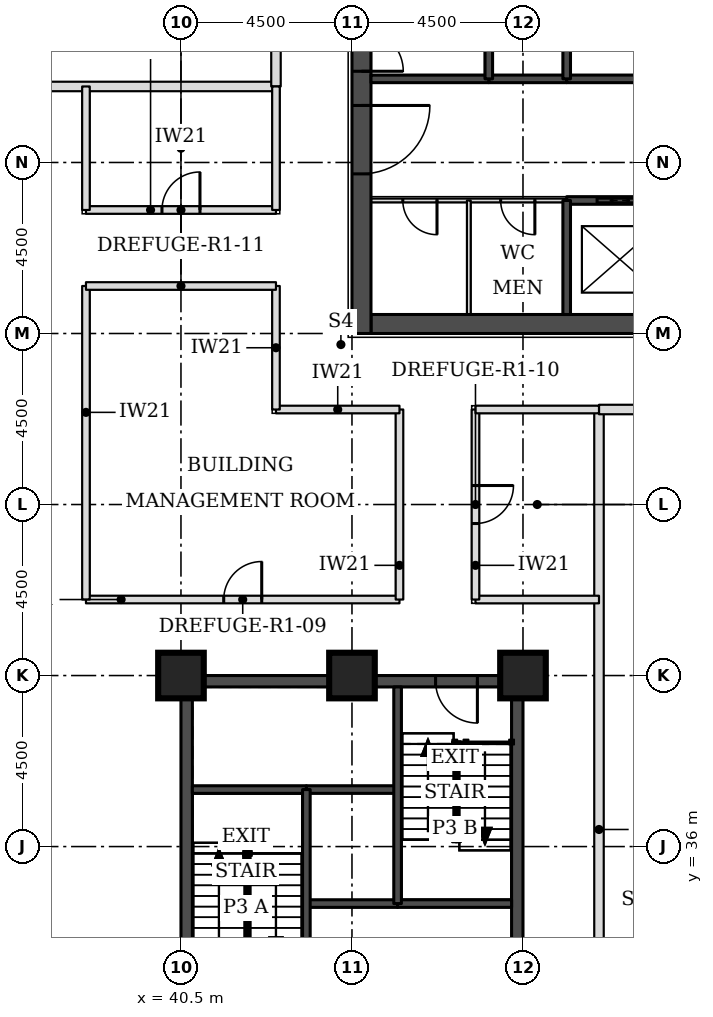
"""IFC4 building model, lengths in metres.
Left out: names, types, materials, properties, quantities, classifications, styles, units other than length and angle.
Written with IfcOpenShell. Run it as: python <this file> out.ifc"""

import sys

from ifc_helpers import new_model, si_unit, direction, frame, frame_2d, origin, origin_2d, place, context, subcontext, project, spatial, rectangle, extrude, element, fill, save


model = new_model("IFC4")
c1 = context("Model", 3, precision=1e-05, world=origin(), true_north=direction((0.0, 1.0)))
c2 = subcontext(c1, "Body", "Model", "MODEL_VIEW")
j1 = project(units=[si_unit("LENGTHUNIT", "METRE"), si_unit("PLANEANGLEUNIT", "RADIAN")], contexts=[c1])
p1 = place(None, origin())
s1 = spatial("IfcSite", under=j1, at=p1, CompositionType="ELEMENT")
p2 = place(p1, origin())
s2 = spatial("IfcBuilding", under=s1, at=p2, CompositionType="ELEMENT")
p3 = place(p2, frame((0.0, 0.0, 69.3)))
s3 = spatial("IfcBuildingStorey", under=s2, at=p3, CompositionType="ELEMENT", Elevation=69.3)
for number, where, z_axis, x_axis in (
    (1, (40.5, 40.5, 0.0), (0.0, 0.0, 1.0), (1.0, 0.0, 0.0)),
    (2, (45.0, 40.5, 0.0), (0.0, 0.0, 1.0), (1.0, 0.0, 0.0)),
    (3, (49.5, 40.5, 0.0), (0.0, 0.0, 1.0), (1.0, 0.0, 0.0)),
):
    element("IfcColumn", number, at=place(p3, frame(where, z_axis=z_axis, x_axis=x_axis)), inside=s3, PredefinedType="COLUMN", context=c2, shape_type="SweptSolid", body=[
        extrude(rectangle(XDim=1.2, YDim=1.2, at=origin_2d()), origin(), (0.0, 0.0, 1.0), 5.0),
    ])
p4 = place(p3, frame((45.5, 49.75, 0.0), z_axis=(0.0, 0.0, 1.0), x_axis=(1.0, 0.0, 0.0)))
e4 = element("IfcWall", 4, at=p4, inside=s3, PredefinedType="SHEAR", context=c2, shape_type="SweptSolid", body=[
    extrude(rectangle(XDim=21.5, YDim=0.5, at=frame_2d((10.75, 0.0))), origin(), (0.0, 0.0, 1.0), 5.0),
])
p5 = place(p3, frame((45.25, 49.5, 0.0), z_axis=(0.0, 0.0, 1.0), x_axis=(0.0, 1.0, 0.0)))
e5 = element("IfcWall", 5, at=p5, inside=s3, PredefinedType="SHEAR", context=c2, shape_type="SweptSolid", body=[
    extrude(rectangle(XDim=22.5, YDim=0.5, at=frame_2d((11.25, 0.0))), origin(), (0.0, 0.0, 1.0), 5.0),
])
p6 = place(p5, frame((4.2, 0.0, 0.0)))
e6 = element("IfcOpeningElement", 6, at=p6, cuts=e5, PredefinedType="OPENING", context=c2, shape_type="SweptSolid", body=[
    extrude(rectangle(XDim=1.8, YDim=2.1, at=frame_2d((0.9, 1.05))), frame((0.0, 0.26, 0.0), z_axis=(0.0, -1.0, 0.0), x_axis=(1.0, 0.0, 0.0)), (0.0, 0.0, 1.0), 0.52),
])
p7 = place(p5, frame((6.9, 0.0, 0.0)))
e7 = element("IfcOpeningElement", 7, at=p7, cuts=e5, PredefinedType="OPENING", context=c2, shape_type="SweptSolid", body=[
    extrude(rectangle(XDim=1.1, YDim=2.1, at=frame_2d((0.55, 1.05))), frame((0.0, 0.26, 0.0), z_axis=(0.0, -1.0, 0.0), x_axis=(1.0, 0.0, 0.0)), (0.0, 0.0, 1.0), 0.52),
])
p8 = place(p5, frame((13.6, 0.0, 0.0)))
e8 = element("IfcOpeningElement", 8, at=p8, cuts=e5, PredefinedType="OPENING", context=c2, shape_type="SweptSolid", body=[
    extrude(rectangle(XDim=1.1, YDim=2.1, at=frame_2d((0.55, 1.05))), frame((0.0, 0.26, 0.0), z_axis=(0.0, -1.0, 0.0), x_axis=(1.0, 0.0, 0.0)), (0.0, 0.0, 1.0), 0.52),
])
p9 = place(p5, frame((16.5, 0.0, 0.0)))
e9 = element("IfcOpeningElement", 9, at=p9, cuts=e5, PredefinedType="OPENING", context=c2, shape_type="SweptSolid", body=[
    extrude(rectangle(XDim=1.8, YDim=2.1, at=frame_2d((0.9, 1.05))), frame((0.0, 0.26, 0.0), z_axis=(0.0, -1.0, 0.0), x_axis=(1.0, 0.0, 0.0)), (0.0, 0.0, 1.0), 0.52),
])
p10 = place(p3, frame((40.8, 40.35, 0.0), z_axis=(0.0, 0.0, 1.0), x_axis=(1.0, 0.0, 0.0)))
e10 = element("IfcWall", 10, at=p10, inside=s3, PredefinedType="SHEAR", context=c2, shape_type="SweptSolid", body=[
    extrude(rectangle(XDim=8.4, YDim=0.3, at=frame_2d((4.2, 0.0))), origin(), (0.0, 0.0, 1.0), 5.0),
])
p11 = place(p10, frame((6.4, 0.0, 0.0)))
e11 = element("IfcOpeningElement", 11, at=p11, cuts=e10, PredefinedType="OPENING", context=c2, shape_type="SweptSolid", body=[
    extrude(rectangle(XDim=1.1, YDim=2.1, at=frame_2d((0.55, 1.05))), frame((0.0, 0.16, 0.0), z_axis=(0.0, -1.0, 0.0), x_axis=(1.0, 0.0, 0.0)), (0.0, 0.0, 1.0), 0.32),
])
p12 = place(p3, frame((40.65, 31.5, 0.0), z_axis=(0.0, 0.0, 1.0), x_axis=(0.0, 1.0, 0.0)))
e12 = element("IfcWall", 12, at=p12, inside=s3, PredefinedType="SHEAR", context=c2, shape_type="SweptSolid", body=[
    extrude(rectangle(XDim=9.0, YDim=0.3, at=frame_2d((4.5, 0.0))), origin(), (0.0, 0.0, 1.0), 5.0),
])
p13 = place(p12, frame((0.4, 0.0, 0.0)))
e13 = element("IfcOpeningElement", 13, at=p13, cuts=e12, PredefinedType="OPENING", context=c2, shape_type="SweptSolid", body=[
    extrude(rectangle(XDim=1.1, YDim=2.1, at=frame_2d((0.55, 1.05))), frame((0.0, 0.16, 0.0), z_axis=(0.0, -1.0, 0.0), x_axis=(1.0, 0.0, 0.0)), (0.0, 0.0, 1.0), 0.32),
])
p14 = place(p3, frame((49.35, 31.5, 0.0), z_axis=(0.0, 0.0, 1.0), x_axis=(0.0, 1.0, 0.0)))
e14 = element("IfcWall", 14, at=p14, inside=s3, PredefinedType="SHEAR", context=c2, shape_type="SweptSolid", body=[
    extrude(rectangle(XDim=9.0, YDim=0.3, at=frame_2d((4.5, 0.0))), origin(), (0.0, 0.0, 1.0), 5.0),
])
p15 = place(p3, frame((51.5, 25.399, 0.0), z_axis=(0.0, 0.0, 1.0), x_axis=(0.0, 1.0, 0.0)))
e15 = element("IfcWall", 15, at=p15, inside=s3, PredefinedType="PARTITIONING", context=c2, shape_type="SweptSolid", body=[
    extrude(rectangle(XDim=22.101, YDim=0.25, at=frame_2d((11.051, 0.0))), origin(), (0.0, 0.0, 1.0), 4.85),
])
p16 = place(p3, frame((51.5, 47.5, 0.0), z_axis=(0.0, 0.0, 1.0), x_axis=(1.0, 0.0, 0.0)))
e16 = element("IfcWall", 16, at=p16, inside=s3, PredefinedType="PARTITIONING", context=c2, shape_type="SweptSolid", body=[
    extrude(rectangle(XDim=18.0, YDim=0.25, at=frame_2d((9.0, 0.0))), origin(), (0.0, 0.0, 1.0), 4.85),
])
p17 = place(p3, frame((27.0, 56.0, 0.0), z_axis=(0.0, 0.0, 1.0), x_axis=(1.0, 0.0, 0.0)))
e17 = element("IfcWall", 17, at=p17, inside=s3, PredefinedType="PARTITIONING", context=c2, shape_type="SweptSolid", body=[
    extrude(rectangle(XDim=16.0, YDim=0.25, at=frame_2d((8.0, 0.0))), origin(), (0.0, 0.0, 1.0), 4.85),
])
p18 = place(p3, frame((43.0, 56.0, 0.0), z_axis=(0.0, 0.0, 1.0), x_axis=(0.0, 1.0, 0.0)))
e18 = element("IfcWall", 18, at=p18, inside=s3, PredefinedType="PARTITIONING", context=c2, shape_type="SweptSolid", body=[
    extrude(rectangle(XDim=18.0, YDim=0.25, at=frame_2d((9.0, 0.0))), origin(), (0.0, 0.0, 1.0), 4.85),
])
p19 = place(p3, frame((38.0, 42.5, 0.0), z_axis=(0.0, 0.0, 1.0), x_axis=(1.0, 0.0, 0.0)))
e19 = element("IfcWall", 19, at=p19, inside=s3, PredefinedType="PARTITIONING", context=c2, shape_type="SweptSolid", body=[
    extrude(rectangle(XDim=8.25, YDim=0.2, at=frame_2d((4.125, 0.0))), origin(), (0.0, 0.0, 1.0), 4.85),
])
p20 = place(p19, frame((3.625, 0.0, 0.0)))
e20 = element("IfcOpeningElement", 20, at=p20, cuts=e19, PredefinedType="OPENING", context=c2, shape_type="SweptSolid", body=[
    extrude(rectangle(XDim=1.0, YDim=2.1, at=frame_2d((0.5, 1.05))), frame((0.0, 0.11, 0.0), z_axis=(0.0, -1.0, 0.0), x_axis=(1.0, 0.0, 0.0)), (0.0, 0.0, 1.0), 0.22),
])
p21 = place(p3, frame((38.0, 42.5, 0.0), z_axis=(0.0, 0.0, 1.0), x_axis=(0.0, 1.0, 0.0)))
e21 = element("IfcWall", 21, at=p21, inside=s3, PredefinedType="PARTITIONING", context=c2, shape_type="SweptSolid", body=[
    extrude(rectangle(XDim=8.25, YDim=0.2, at=frame_2d((4.125, 0.0))), origin(), (0.0, 0.0, 1.0), 4.85),
])
p22 = place(p3, frame((46.25, 42.5, 0.0), z_axis=(0.0, 0.0, 1.0), x_axis=(0.0, 1.0, 0.0)))
e22 = element("IfcWall", 22, at=p22, inside=s3, PredefinedType="PARTITIONING", context=c2, shape_type="SweptSolid", body=[
    extrude(rectangle(XDim=5.0, YDim=0.2, at=frame_2d((2.5, 0.0))), origin(), (0.0, 0.0, 1.0), 4.85),
])
p23 = place(p3, frame((48.25, 42.5, 0.0), z_axis=(0.0, 0.0, 1.0), x_axis=(1.0, 0.0, 0.0)))
e23 = element("IfcWall", 23, at=p23, inside=s3, PredefinedType="PARTITIONING", context=c2, shape_type="SweptSolid", body=[
    extrude(rectangle(XDim=3.25, YDim=0.2, at=frame_2d((1.625, 0.0))), origin(), (0.0, 0.0, 1.0), 4.85),
])
p24 = place(p3, frame((48.25, 42.5, 0.0), z_axis=(0.0, 0.0, 1.0), x_axis=(0.0, 1.0, 0.0)))
e24 = element("IfcWall", 24, at=p24, inside=s3, PredefinedType="PARTITIONING", context=c2, shape_type="SweptSolid", body=[
    extrude(rectangle(XDim=5.0, YDim=0.2, at=frame_2d((2.5, 0.0))), origin(), (0.0, 0.0, 1.0), 4.85),
])
p25 = place(p24, frame((2.0, 0.0, 0.0)))
e25 = element("IfcOpeningElement", 25, at=p25, cuts=e24, PredefinedType="OPENING", context=c2, shape_type="SweptSolid", body=[
    extrude(rectangle(XDim=1.0, YDim=2.1, at=frame_2d((0.5, 1.05))), frame((0.0, 0.11, 0.0), z_axis=(0.0, -1.0, 0.0), x_axis=(1.0, 0.0, 0.0)), (0.0, 0.0, 1.0), 0.22),
])
for number, where, z_axis, x_axis in (
    (26, (43.0, 47.5, 0.0), (0.0, 0.0, 1.0), (1.0, 0.0, 0.0)),
    (27, (43.0, 47.5, 0.0), (0.0, 0.0, 1.0), (0.0, 1.0, 0.0)),
    (28, (48.25, 47.5, 0.0), (0.0, 0.0, 1.0), (1.0, 0.0, 0.0)),
):
    element("IfcWall", number, at=place(p3, frame(where, z_axis=z_axis, x_axis=x_axis)), inside=s3, PredefinedType="PARTITIONING", context=c2, shape_type="SweptSolid", body=[
        extrude(rectangle(XDim=3.25, YDim=0.2, at=frame_2d((1.625, 0.0))), origin(), (0.0, 0.0, 1.0), 4.85),
    ])
p26 = place(p3, frame((38.0, 50.75, 0.0), z_axis=(0.0, 0.0, 1.0), x_axis=(1.0, 0.0, 0.0)))
e29 = element("IfcWall", 29, at=p26, inside=s3, PredefinedType="PARTITIONING", context=c2, shape_type="SweptSolid", body=[
    extrude(rectangle(XDim=5.0, YDim=0.2, at=frame_2d((2.5, 0.0))), origin(), (0.0, 0.0, 1.0), 4.85),
])
p27 = place(p3, frame((38.0, 52.75, 0.0), z_axis=(0.0, 0.0, 1.0), x_axis=(1.0, 0.0, 0.0)))
e30 = element("IfcWall", 30, at=p27, inside=s3, PredefinedType="PARTITIONING", context=c2, shape_type="SweptSolid", body=[
    extrude(rectangle(XDim=5.0, YDim=0.2, at=frame_2d((2.5, 0.0))), origin(), (0.0, 0.0, 1.0), 4.85),
])
p28 = place(p27, frame((2.0, 0.0, 0.0)))
e31 = element("IfcOpeningElement", 31, at=p28, cuts=e30, PredefinedType="OPENING", context=c2, shape_type="SweptSolid", body=[
    extrude(rectangle(XDim=1.0, YDim=2.1, at=frame_2d((0.5, 1.05))), frame((0.0, 0.11, 0.0), z_axis=(0.0, -1.0, 0.0), x_axis=(1.0, 0.0, 0.0)), (0.0, 0.0, 1.0), 0.22),
])
for number, where, z_axis, x_axis in (
    (32, (38.0, 52.75, 0.0), (0.0, 0.0, 1.0), (0.0, 1.0, 0.0)),
    (33, (43.0, 52.75, 0.0), (0.0, 0.0, 1.0), (0.0, 1.0, 0.0)),
):
    element("IfcWall", number, at=place(p3, frame(where, z_axis=z_axis, x_axis=x_axis)), inside=s3, PredefinedType="PARTITIONING", context=c2, shape_type="SweptSolid", body=[
        extrude(rectangle(XDim=3.25, YDim=0.2, at=frame_2d((1.625, 0.0))), origin(), (0.0, 0.0, 1.0), 4.85),
    ])
p29 = place(p3, frame((45.5, 53.0, 0.0), z_axis=(0.0, 0.0, 1.0), x_axis=(1.0, 0.0, 0.0)))
e34 = element("IfcWall", 34, at=p29, inside=s3, PredefinedType="PARTITIONING", context=c2, shape_type="SweptSolid", body=[
    extrude(rectangle(XDim=5.15, YDim=0.1, at=frame_2d((2.575, 0.0))), origin(), (0.0, 0.0, 1.0), 4.85),
])
p30 = place(p29, frame((0.837, 0.0, 0.0)))
e35 = element("IfcOpeningElement", 35, at=p30, cuts=e34, PredefinedType="OPENING", context=c2, shape_type="SweptSolid", body=[
    extrude(rectangle(XDim=0.9, YDim=2.1, at=frame_2d((0.45, 1.05))), frame((0.0, 0.06, 0.0), z_axis=(0.0, -1.0, 0.0), x_axis=(1.0, 0.0, 0.0)), (0.0, 0.0, 1.0), 0.12),
])
p31 = place(p29, frame((3.413, 0.0, 0.0)))
e36 = element("IfcOpeningElement", 36, at=p31, cuts=e34, PredefinedType="OPENING", context=c2, shape_type="SweptSolid", body=[
    extrude(rectangle(XDim=0.9, YDim=2.1, at=frame_2d((0.45, 1.05))), frame((0.0, 0.06, 0.0), z_axis=(0.0, -1.0, 0.0), x_axis=(1.0, 0.0, 0.0)), (0.0, 0.0, 1.0), 0.12),
])
p32 = place(p3, frame((50.65, 53.0, 0.0), z_axis=(0.0, 0.0, 1.0), x_axis=(1.0, 0.0, 0.0)))
e37 = element("IfcWall", 37, at=p32, inside=s3, PredefinedType="SOLIDWALL", context=c2, shape_type="SweptSolid", body=[
    extrude(rectangle(XDim=11.2, YDim=0.2, at=frame_2d((5.6, 0.0))), origin(), (0.0, 0.0, 1.0), 4.85),
])
p33 = place(p32, frame((0.8, 0.0, 0.0)))
e38 = element("IfcOpeningElement", 38, at=p33, cuts=e37, PredefinedType="OPENING", context=c2, shape_type="SweptSolid", body=[
    extrude(rectangle(XDim=1.2, YDim=2.1, at=frame_2d((0.6, 1.05))), frame((0.0, 0.11, 0.0), z_axis=(0.0, -1.0, 0.0), x_axis=(1.0, 0.0, 0.0)), (0.0, 0.0, 1.0), 0.22),
])
p34 = place(p32, frame((3.6, 0.0, 0.0)))
e39 = element("IfcOpeningElement", 39, at=p34, cuts=e37, PredefinedType="OPENING", context=c2, shape_type="SweptSolid", body=[
    extrude(rectangle(XDim=1.2, YDim=2.1, at=frame_2d((0.6, 1.05))), frame((0.0, 0.11, 0.0), z_axis=(0.0, -1.0, 0.0), x_axis=(1.0, 0.0, 0.0)), (0.0, 0.0, 1.0), 0.22),
])
p35 = place(p32, frame((6.4, 0.0, 0.0)))
e40 = element("IfcOpeningElement", 40, at=p35, cuts=e37, PredefinedType="OPENING", context=c2, shape_type="SweptSolid", body=[
    extrude(rectangle(XDim=1.2, YDim=2.1, at=frame_2d((0.6, 1.05))), frame((0.0, 0.11, 0.0), z_axis=(0.0, -1.0, 0.0), x_axis=(1.0, 0.0, 0.0)), (0.0, 0.0, 1.0), 0.22),
])
p36 = place(p32, frame((9.2, 0.0, 0.0)))
e41 = element("IfcOpeningElement", 41, at=p36, cuts=e37, PredefinedType="OPENING", context=c2, shape_type="SweptSolid", body=[
    extrude(rectangle(XDim=1.2, YDim=2.1, at=frame_2d((0.6, 1.05))), frame((0.0, 0.11, 0.0), z_axis=(0.0, -1.0, 0.0), x_axis=(1.0, 0.0, 0.0)), (0.0, 0.0, 1.0), 0.22),
])
p37 = place(p3, frame((48.6, 56.2, 0.0), z_axis=(0.0, 0.0, 1.0), x_axis=(1.0, 0.0, 0.0)))
e42 = element("IfcWall", 42, at=p37, inside=s3, PredefinedType="SOLIDWALL", context=c2, shape_type="SweptSolid", body=[
    extrude(rectangle(XDim=2.05, YDim=0.2, at=frame_2d((1.025, 0.0))), origin(), (0.0, 0.0, 1.0), 4.85),
])
p38 = place(p3, frame((45.5, 56.2, 0.0), z_axis=(0.0, 0.0, 1.0), x_axis=(1.0, 0.0, 0.0)))
e43 = element("IfcWall", 43, at=p38, inside=s3, PredefinedType="SOLIDWALL", context=c2, shape_type="SweptSolid", body=[
    extrude(rectangle(XDim=3.1, YDim=0.2, at=frame_2d((1.55, 0.0))), origin(), (0.0, 0.0, 1.0), 4.85),
])
p39 = place(p3, frame((50.65, 56.2, 0.0), z_axis=(0.0, 0.0, 1.0), x_axis=(1.0, 0.0, 0.0)))
e44 = element("IfcWall", 44, at=p39, inside=s3, PredefinedType="SOLIDWALL", context=c2, shape_type="SweptSolid", body=[
    extrude(rectangle(XDim=11.2, YDim=0.2, at=frame_2d((5.6, 0.0))), origin(), (0.0, 0.0, 1.0), 4.85),
])
p40 = place(p3, frame((48.075, 50.0, 0.0), z_axis=(0.0, 0.0, 1.0), x_axis=(0.0, 1.0, 0.0)))
e45 = element("IfcWall", 45, at=p40, inside=s3, PredefinedType="PARTITIONING", context=c2, shape_type="SweptSolid", body=[
    extrude(rectangle(XDim=3.0, YDim=0.1, at=frame_2d((1.5, 0.0))), origin(), (0.0, 0.0, 1.0), 4.85),
])
p41 = place(p3, frame((48.6, 56.2, 0.0), z_axis=(0.0, 0.0, 1.0), x_axis=(0.0, 1.0, 0.0)))
e46 = element("IfcWall", 46, at=p41, inside=s3, PredefinedType="SOLIDWALL", context=c2, shape_type="SweptSolid", body=[
    extrude(rectangle(XDim=5.8, YDim=0.2, at=frame_2d((2.9, 0.0))), origin(), (0.0, 0.0, 1.0), 4.85),
])
p42 = place(p3, frame((50.65, 50.0, 0.0), z_axis=(0.0, 0.0, 1.0), x_axis=(0.0, 1.0, 0.0)))
e47 = element("IfcWall", 47, at=p42, inside=s3, PredefinedType="SOLIDWALL", context=c2, shape_type="SweptSolid", body=[
    extrude(rectangle(XDim=3.0, YDim=0.2, at=frame_2d((1.5, 0.0))), origin(), (0.0, 0.0, 1.0), 4.85),
])
p43 = place(p3, frame((50.65, 56.2, 0.0), z_axis=(0.0, 0.0, 1.0), x_axis=(0.0, 1.0, 0.0)))
e48 = element("IfcWall", 48, at=p43, inside=s3, PredefinedType="SOLIDWALL", context=c2, shape_type="SweptSolid", body=[
    extrude(rectangle(XDim=2.8, YDim=0.2, at=frame_2d((1.4, 0.0))), origin(), (0.0, 0.0, 1.0), 4.85),
])
p44 = place(p3, frame((43.8, 34.5, 0.0), z_axis=(0.0, 0.0, 1.0), x_axis=(1.0, 0.0, 0.0)))
e49 = element("IfcWall", 49, at=p44, inside=s3, PredefinedType="SOLIDWALL", context=c2, shape_type="SweptSolid", body=[
    extrude(rectangle(XDim=2.4, YDim=0.2, at=frame_2d((1.2, 0.0))), origin(), (0.0, 0.0, 1.0), 4.85),
])
p45 = place(p3, frame((46.2, 34.5, 0.0), z_axis=(0.0, 0.0, 1.0), x_axis=(1.0, 0.0, 0.0)))
e50 = element("IfcWall", 50, at=p45, inside=s3, PredefinedType="SOLIDWALL", context=c2, shape_type="SweptSolid", body=[
    extrude(rectangle(XDim=3.0, YDim=0.2, at=frame_2d((1.5, 0.0))), origin(), (0.0, 0.0, 1.0), 4.85),
])
p46 = place(p3, frame((43.8, 37.5, 0.0), z_axis=(0.0, 0.0, 1.0), x_axis=(1.0, 0.0, 0.0)))
e51 = element("IfcWall", 51, at=p46, inside=s3, PredefinedType="SOLIDWALL", context=c2, shape_type="SweptSolid", body=[
    extrude(rectangle(XDim=2.4, YDim=0.2, at=frame_2d((1.2, 0.0))), origin(), (0.0, 0.0, 1.0), 5.0),
])
p47 = place(p3, frame((40.8, 37.5, 0.0), z_axis=(0.0, 0.0, 1.0), x_axis=(1.0, 0.0, 0.0)))
e52 = element("IfcWall", 52, at=p47, inside=s3, PredefinedType="SOLIDWALL", context=c2, shape_type="SweptSolid", body=[
    extrude(rectangle(XDim=3.0, YDim=0.2, at=frame_2d((1.5, 0.0))), origin(), (0.0, 0.0, 1.0), 4.85),
])
for number, where, z_axis, x_axis in (
    (53, (43.8, 31.8, 0.0), (0.0, 0.0, 1.0), (0.0, 1.0, 0.0)),
    (54, (46.2, 34.5, 0.0), (0.0, 0.0, 1.0), (0.0, 1.0, 0.0)),
):
    element("IfcWall", number, at=place(p3, frame(where, z_axis=z_axis, x_axis=x_axis)), inside=s3, PredefinedType="SOLIDWALL", context=c2, shape_type="SweptSolid", body=[
        extrude(rectangle(XDim=5.7, YDim=0.2, at=frame_2d((2.85, 0.0))), origin(), (0.0, 0.0, 1.0), 4.85),
    ])
p48 = place(p25, frame((1.0, 0.0, 0.0), z_axis=(0.0, 0.0, 1.0), x_axis=(-1.0, 0.0, 0.0)))
e55 = element("IfcDoor", 55, at=p48, inside=s3, OperationType="SINGLE_SWING_LEFT", PredefinedType="DOOR", context=c2, shape_type="SweptSolid", body=[
    extrude(rectangle(XDim=1.0, YDim=2.1, at=frame_2d((0.5, 1.05))), frame((0.0, 0.025, 0.0), z_axis=(0.0, -1.0, 0.0), x_axis=(1.0, 0.0, 0.0)), (0.0, 0.0, 1.0), 0.05),
])
fill(e25, e55)
p49 = place(p20, origin())
e56 = element("IfcDoor", 56, at=p49, inside=s3, OperationType="SINGLE_SWING_RIGHT", PredefinedType="DOOR", context=c2, shape_type="SweptSolid", body=[
    extrude(rectangle(XDim=1.0, YDim=2.1, at=frame_2d((0.5, 1.05))), frame((0.0, 0.025, 0.0), z_axis=(0.0, -1.0, 0.0), x_axis=(1.0, 0.0, 0.0)), (0.0, 0.0, 1.0), 0.05),
])
fill(e20, e56)
p50 = place(p28, origin())
e57 = element("IfcDoor", 57, at=p50, inside=s3, OperationType="SINGLE_SWING_RIGHT", PredefinedType="DOOR", context=c2, shape_type="SweptSolid", body=[
    extrude(rectangle(XDim=1.0, YDim=2.1, at=frame_2d((0.5, 1.05))), frame((0.0, 0.025, 0.0), z_axis=(0.0, -1.0, 0.0), x_axis=(1.0, 0.0, 0.0)), (0.0, 0.0, 1.0), 0.05),
])
fill(e31, e57)
p51 = place(p33, origin())
e58 = element("IfcDoor", 58, at=p51, inside=s3, OperationType="DOUBLE_DOOR_SLIDING", PredefinedType="DOOR", context=c2, shape_type="SweptSolid", body=[
    extrude(rectangle(XDim=1.2, YDim=2.1, at=frame_2d((0.6, 1.05))), frame((0.0, 0.025, 0.0), z_axis=(0.0, -1.0, 0.0), x_axis=(1.0, 0.0, 0.0)), (0.0, 0.0, 1.0), 0.05),
])
fill(e38, e58)
p52 = place(p6, frame((1.8, 0.0, 0.0), z_axis=(0.0, 0.0, 1.0), x_axis=(-1.0, 0.0, 0.0)))
e59 = element("IfcDoor", 59, at=p52, inside=s3, OperationType="SINGLE_SWING_LEFT", PredefinedType="DOOR", context=c2, shape_type="SweptSolid", body=[
    extrude(rectangle(XDim=1.8, YDim=2.1, at=frame_2d((0.9, 1.05))), frame((0.0, 0.025, 0.0), z_axis=(0.0, -1.0, 0.0), x_axis=(1.0, 0.0, 0.0)), (0.0, 0.0, 1.0), 0.05),
])
fill(e6, e59)
p53 = place(p7, frame((1.1, 0.0, 0.0), z_axis=(0.0, 0.0, 1.0), x_axis=(-1.0, 0.0, 0.0)))
e60 = element("IfcDoor", 60, at=p53, inside=s3, OperationType="SINGLE_SWING_RIGHT", PredefinedType="DOOR", context=c2, shape_type="SweptSolid", body=[
    extrude(rectangle(XDim=1.1, YDim=2.1, at=frame_2d((0.55, 1.05))), frame((0.0, 0.025, 0.0), z_axis=(0.0, -1.0, 0.0), x_axis=(1.0, 0.0, 0.0)), (0.0, 0.0, 1.0), 0.05),
])
fill(e7, e60)
p54 = place(p30, frame((0.9, 0.0, 0.0), z_axis=(0.0, 0.0, 1.0), x_axis=(-1.0, 0.0, 0.0)))
e61 = element("IfcDoor", 61, at=p54, inside=s3, OperationType="SINGLE_SWING_LEFT", PredefinedType="DOOR", context=c2, shape_type="SweptSolid", body=[
    extrude(rectangle(XDim=0.9, YDim=2.1, at=frame_2d((0.45, 1.05))), frame((0.0, 0.025, 0.0), z_axis=(0.0, -1.0, 0.0), x_axis=(1.0, 0.0, 0.0)), (0.0, 0.0, 1.0), 0.05),
])
fill(e35, e61)
p55 = place(p31, frame((0.9, 0.0, 0.0), z_axis=(0.0, 0.0, 1.0), x_axis=(-1.0, 0.0, 0.0)))
e62 = element("IfcDoor", 62, at=p55, inside=s3, OperationType="SINGLE_SWING_LEFT", PredefinedType="DOOR", context=c2, shape_type="SweptSolid", body=[
    extrude(rectangle(XDim=0.9, YDim=2.1, at=frame_2d((0.45, 1.05))), frame((0.0, 0.025, 0.0), z_axis=(0.0, -1.0, 0.0), x_axis=(1.0, 0.0, 0.0)), (0.0, 0.0, 1.0), 0.05),
])
fill(e36, e62)
p56 = place(p11, frame((1.1, 0.0, 0.0), z_axis=(0.0, 0.0, 1.0), x_axis=(-1.0, 0.0, 0.0)))
e63 = element("IfcDoor", 63, at=p56, inside=s3, OperationType="SINGLE_SWING_LEFT", PredefinedType="DOOR", context=c2, shape_type="SweptSolid", body=[
    extrude(rectangle(XDim=1.1, YDim=2.1, at=frame_2d((0.55, 1.05))), frame((0.0, 0.025, 0.0), z_axis=(0.0, -1.0, 0.0), x_axis=(1.0, 0.0, 0.0)), (0.0, 0.0, 1.0), 0.05),
])
fill(e11, e63)
save(model, sys.argv[1])
